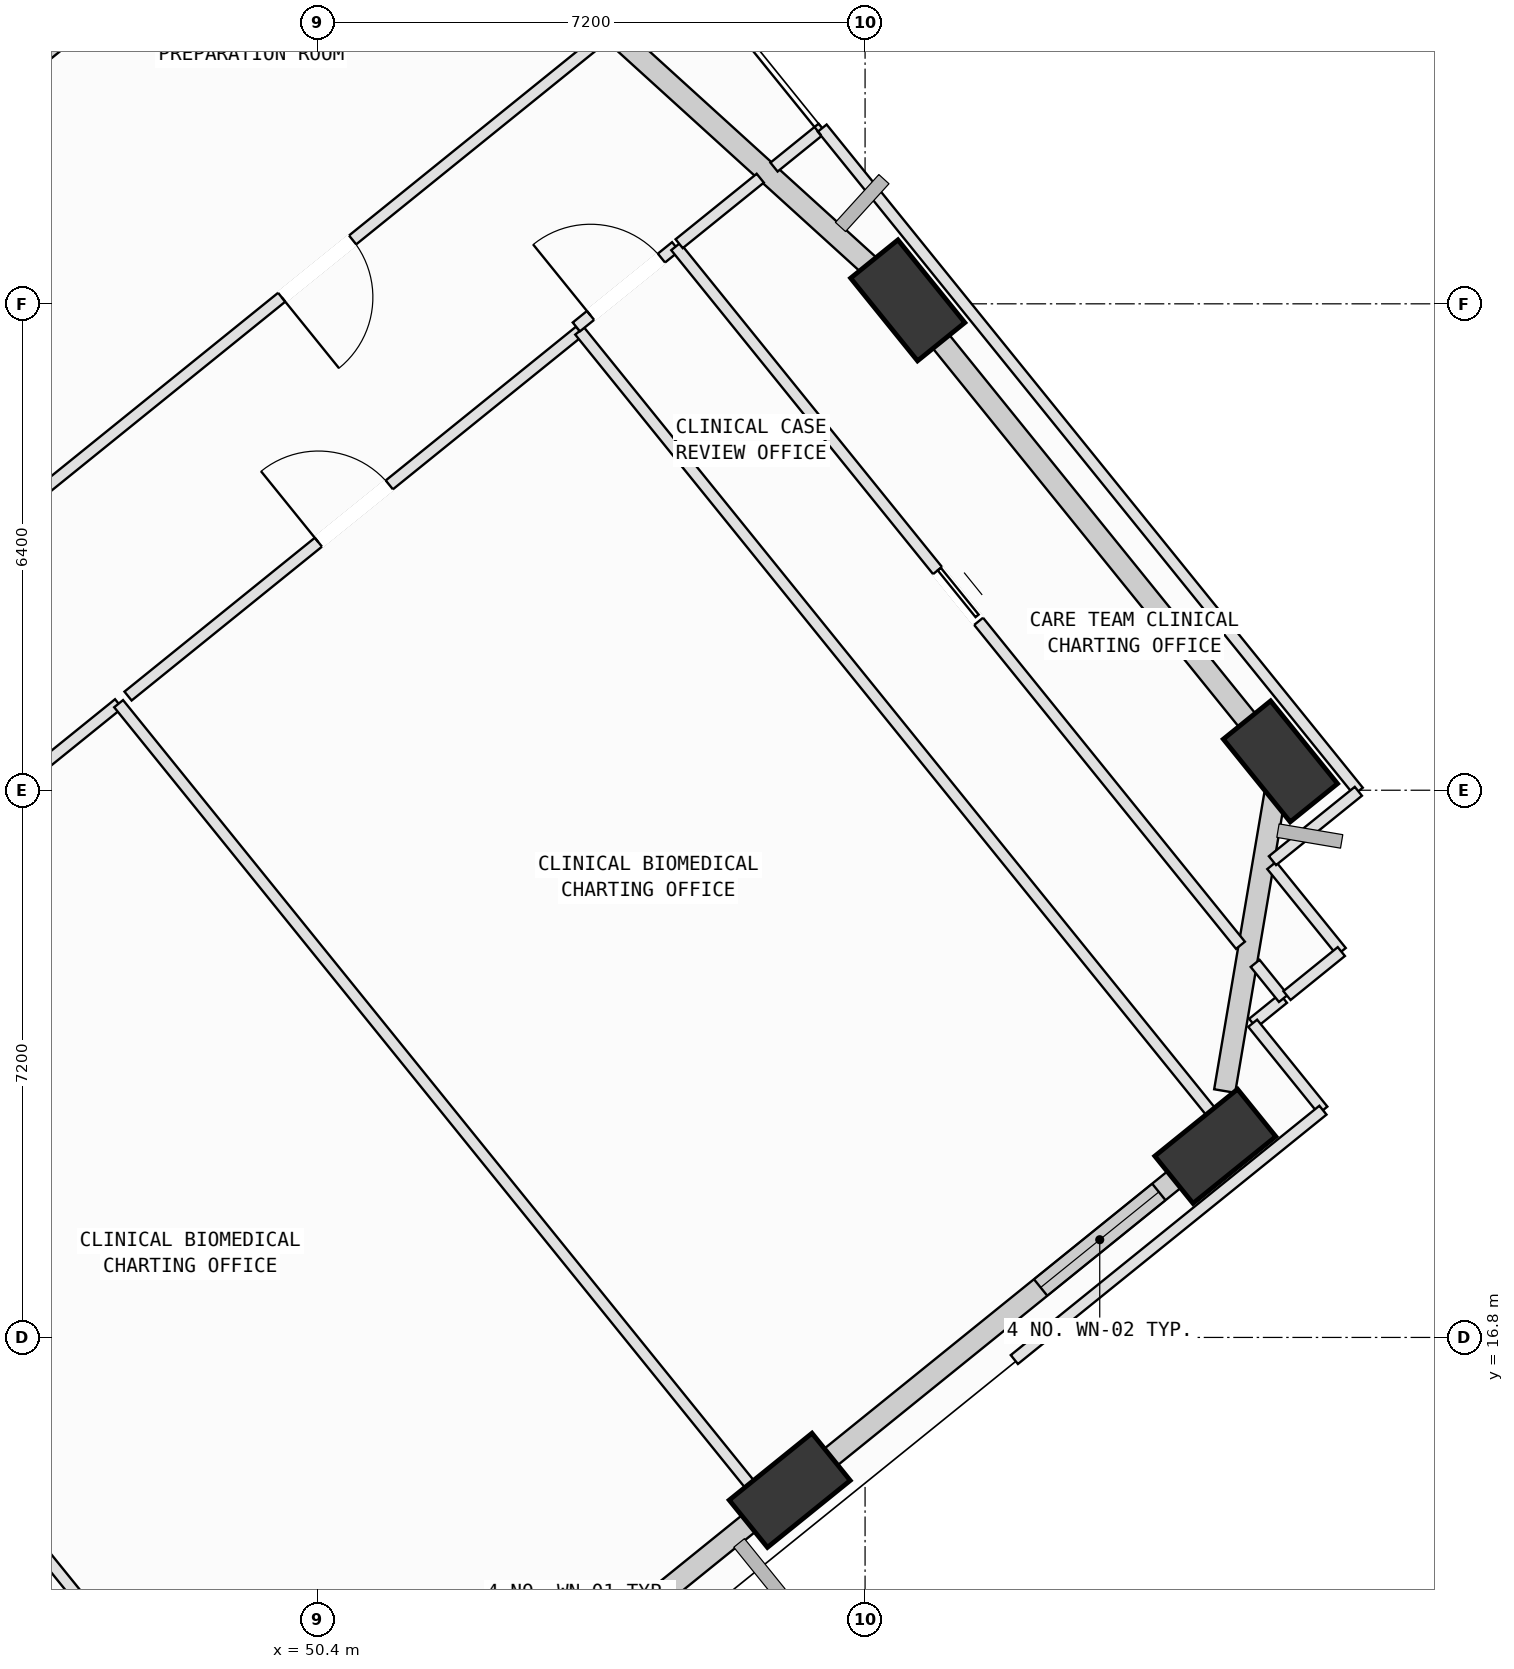
"""IFC4 building model, lengths in metres.
Left out: names, types, materials, properties, quantities, classifications, styles, units other than length and angle.
Written with IfcOpenShell. Run it as: python <this file> out.ifc"""

import sys

from ifc_helpers import new_model, si_unit, direction, frame, frame_2d, origin, origin_2d, place, context, subcontext, project, spatial, rectangle, extrude, element, fill, save


model = new_model("IFC4")
c1 = context("Model", 3, precision=1e-05, world=origin(), true_north=direction((0.0, 1.0)))
c2 = subcontext(c1, "Body", "Model", "MODEL_VIEW")
j1 = project(units=[si_unit("LENGTHUNIT", "METRE"), si_unit("PLANEANGLEUNIT", "RADIAN")], contexts=[c1])
p1 = place(None, origin())
s1 = spatial("IfcSite", under=j1, at=p1, CompositionType="ELEMENT")
p2 = place(p1, origin())
s2 = spatial("IfcBuilding", under=s1, at=p2, CompositionType="ELEMENT")
p3 = place(p2, frame((0.0, 0.0, 189.8)))
s3 = spatial("IfcBuildingStorey", under=s2, at=p3, CompositionType="ELEMENT", Elevation=189.8)
p4 = place(p3, frame((56.609, 14.789, 0.002), z_axis=(0.040468561583, 0.095155806966, 0.994639466301), x_axis=(-0.960371938901, -0.271035474756, 0.065003926005)))
e1 = element("IfcColumn", 1, at=p4, inside=s3, PredefinedType="COLUMN", context=c2, shape_type="SweptSolid", body=[
    extrude(rectangle(XDim=1.4, YDim=0.8, at=origin_2d()), origin(), (0.0, 0.0, 1.0), 4.018),
])
p5 = place(p3, frame((62.208, 19.315, 0.002), z_axis=(0.021591623712, 0.117904821617, 0.992790136345), x_axis=(-0.87739579049, -0.473812861045, 0.075352501881)))
e2 = element("IfcColumn", 2, at=p5, inside=s3, PredefinedType="COLUMN", context=c2, shape_type="SweptSolid", body=[
    extrude(rectangle(XDim=1.4, YDim=0.8, at=origin_2d()), origin(), (0.0, 0.0, 1.0), 4.025),
])
p6 = place(p3, frame((63.065, 24.379, 0.002), z_axis=(0.00072768673, 0.121220481061, 0.992625339916), x_axis=(0.623996645907, -0.775719377795, 0.09427424256)))
e3 = element("IfcColumn", 3, at=p6, inside=s3, PredefinedType="COLUMN", context=c2, shape_type="SweptSolid", body=[
    extrude(rectangle(XDim=1.4, YDim=0.8, at=origin_2d()), origin(), (0.0, 0.0, 1.0), 4.026),
])
p7 = place(p3, frame((58.161, 30.445, 0.002), z_axis=(-0.024061064309, 0.101105078309, 0.994584751705), x_axis=(0.790635707112, -0.606928768275, 0.080824803618)))
e4 = element("IfcColumn", 4, at=p7, inside=s3, PredefinedType="COLUMN", context=c2, shape_type="SweptSolid", body=[
    extrude(rectangle(XDim=1.4, YDim=0.8, at=origin_2d()), origin(), (0.0, 0.0, 1.0), 4.018),
])
p8 = place(p3, frame((56.373, 14.598, 0.0), z_axis=(0.0, 0.0, 1.0), x_axis=(-0.77770639609, -0.628627681129, 0.0)))
e5 = element("IfcWall", 5, at=p8, inside=s3, PredefinedType="SOLIDWALL", context=c2, shape_type="SweptSolid", body=[
    extrude(rectangle(XDim=6.218, YDim=0.28, at=frame_2d((3.109, 0.0))), origin(), (0.0, 0.0, 1.0), 3.265),
])
p9 = place(p8, frame((2.442, 0.0, 0.75)))
e6 = element("IfcOpeningElement", 6, at=p9, cuts=e5, PredefinedType="OPENING", context=c2, shape_type="SweptSolid", body=[
    extrude(rectangle(XDim=1.6, YDim=1.95, at=frame_2d((0.8, 0.975))), frame((0.0, 0.15, 0.0), z_axis=(0.0, -1.0, 0.0), x_axis=(1.0, 0.0, 0.0)), (0.0, 0.0, 1.0), 0.3),
])
p10 = place(p3, frame((61.984, 19.134, 0.0), z_axis=(0.0, 0.0, 1.0), x_axis=(-0.777691861755, -0.628645661848, 0.0)))
e7 = element("IfcWall", 7, at=p10, inside=s3, PredefinedType="SOLIDWALL", context=c2, shape_type="SweptSolid", body=[
    extrude(rectangle(XDim=6.242, YDim=0.28, at=frame_2d((3.121, 0.0))), origin(), (0.0, 0.0, 1.0), 3.265),
])
p11 = place(p10, frame((0.668, 0.0, 0.75)))
e8 = element("IfcOpeningElement", 8, at=p11, cuts=e7, PredefinedType="OPENING", context=c2, shape_type="SweptSolid", body=[
    extrude(rectangle(XDim=2.0, YDim=1.95, at=frame_2d((1.0, 0.975))), frame((0.0, 0.15, 0.0), z_axis=(0.0, -1.0, 0.0), x_axis=(1.0, 0.0, 0.0)), (0.0, 0.0, 1.0), 0.3),
])
p12 = place(p3, frame((63.022, 24.129, 0.0), z_axis=(0.0, 0.0, 1.0), x_axis=(-0.166795761072, -0.985991467554, 0.0)))
e9 = element("IfcWall", 9, at=p12, inside=s3, PredefinedType="SOLIDWALL", context=c2, shape_type="SweptSolid", body=[
    extrude(rectangle(XDim=4.145, YDim=0.28, at=frame_2d((2.073, 0.0))), origin(), (0.0, 0.0, 1.0), 3.265),
])
p13 = place(p3, frame((58.35, 30.212, 0.0), z_axis=(0.0, 0.0, 1.0), x_axis=(0.628622032356, -0.777710962014, 0.0)))
e10 = element("IfcWall", 10, at=p13, inside=s3, PredefinedType="SOLIDWALL", context=c2, shape_type="SweptSolid", body=[
    extrude(rectangle(XDim=6.84, YDim=0.28, at=frame_2d((3.42, 0.0))), origin(), (0.0, 0.0, 1.0), 3.265),
])
p14 = place(p3, frame((51.136, 36.829, 0.0), z_axis=(0.0, 0.0, 1.0), x_axis=(0.740111301714, -0.672484394671, 0.0)))
e11 = element("IfcWall", 11, at=p14, inside=s3, PredefinedType="SOLIDWALL", context=c2, shape_type="SweptSolid", body=[
    extrude(rectangle(XDim=8.838, YDim=0.28, at=frame_2d((4.419, 0.0))), origin(), (0.0, 0.0, 1.0), 3.265),
])
p15 = place(p3, frame((46.34, 33.363, 0.0), z_axis=(0.0, 0.0, 1.0), x_axis=(0.777703327774, 0.628631477074, 0.0)))
e12 = element("IfcWall", 12, at=p15, inside=s3, PredefinedType="SOLIDWALL", context=c2, shape_type="SweptSolid", body=[
    extrude(rectangle(XDim=5.405, YDim=0.28, at=frame_2d((2.702, 0.0))), origin(), (0.0, 0.0, 1.0), 3.265),
])
p16 = place(p15, frame((1.898, 0.0, 0.75)))
e13 = element("IfcOpeningElement", 13, at=p16, cuts=e12, PredefinedType="OPENING", context=c2, shape_type="SweptSolid", body=[
    extrude(rectangle(XDim=1.6, YDim=1.95, at=frame_2d((0.8, 0.975))), frame((0.0, 0.15, 0.0), z_axis=(0.0, -1.0, 0.0), x_axis=(1.0, 0.0, 0.0)), (0.0, 0.0, 1.0), 0.3),
])
p17 = place(p3, frame((41.744, 20.196, 0.0), z_axis=(0.0, 0.0, 1.0), x_axis=(0.628664865479, -0.777676338146, 0.0)))
e14 = element("IfcWall", 14, at=p17, inside=s3, PredefinedType="PARTITIONING", context=c2, shape_type="SweptSolid", body=[
    extrude(rectangle(XDim=13.435, YDim=0.15, at=frame_2d((6.717, 0.0))), origin(), (0.0, 0.0, 1.0), 3.78),
])
p18 = place(p3, frame((41.837, 20.336, 0.0), z_axis=(0.0, 0.0, 1.0), x_axis=(0.777713450533, 0.628618953628, 0.0)))
e15 = element("IfcWall", 15, at=p18, inside=s3, PredefinedType="PARTITIONING", context=c2, shape_type="SweptSolid", body=[
    extrude(rectangle(XDim=7.641, YDim=0.15, at=frame_2d((3.82, 0.0))), origin(), (0.0, 0.0, 1.0), 3.065),
])
p19 = place(p18, frame((3.22, 0.0, 0.0)))
e16 = element("IfcOpeningElement", 16, at=p19, cuts=e15, PredefinedType="OPENING", context=c2, shape_type="SweptSolid", body=[
    extrude(rectangle(XDim=1.2, YDim=2.15, at=frame_2d((0.6, 1.075))), frame((0.0, 0.085, 0.0), z_axis=(0.0, -1.0, 0.0), x_axis=(1.0, 0.0, 0.0)), (0.0, 0.0, 1.0), 0.17),
])
p20 = place(p3, frame((47.779, 25.139, 0.0), z_axis=(0.0, 0.0, 1.0), x_axis=(0.628603815075, -0.777725686649, 0.0)))
e17 = element("IfcWall", 17, at=p20, inside=s3, PredefinedType="PARTITIONING", context=c2, shape_type="SweptSolid", body=[
    extrude(rectangle(XDim=13.486, YDim=0.15, at=frame_2d((6.743, 0.0))), origin(), (0.0, 0.0, 1.0), 3.78),
])
p21 = place(p3, frame((47.903, 25.239, 0.0), z_axis=(0.0, 0.0, 1.0), x_axis=(0.777700823306, 0.628634575433, 0.0)))
e18 = element("IfcWall", 18, at=p21, inside=s3, PredefinedType="PARTITIONING", context=c2, shape_type="SweptSolid", body=[
    extrude(rectangle(XDim=7.64, YDim=0.15, at=frame_2d((3.82, 0.0))), origin(), (0.0, 0.0, 1.0), 3.78),
])
p22 = place(p21, frame((3.22, 0.0, 0.0)))
e19 = element("IfcOpeningElement", 19, at=p22, cuts=e18, PredefinedType="OPENING", context=c2, shape_type="SweptSolid", body=[
    extrude(rectangle(XDim=1.2, YDim=2.15, at=frame_2d((0.6, 1.075))), frame((0.0, 0.085, 0.0), z_axis=(0.0, -1.0, 0.0), x_axis=(1.0, 0.0, 0.0)), (0.0, 0.0, 1.0), 0.17),
])
p23 = place(p3, frame((53.845, 30.042, 0.0), z_axis=(0.0, 0.0, 1.0), x_axis=(0.628663319938, -0.777677587541, 0.0)))
e20 = element("IfcWall", 20, at=p23, inside=s3, PredefinedType="PARTITIONING", context=c2, shape_type="SweptSolid", body=[
    extrude(rectangle(XDim=13.83, YDim=0.15, at=frame_2d((6.915, 0.0))), origin(), (0.0, 0.0, 1.0), 3.78),
])
p24 = place(p3, frame((62.539, 19.287, 0.0), z_axis=(0.0, 0.0, 1.0), x_axis=(-0.777244870707, -0.629198228668, 0.0)))
e21 = element("IfcWall", 21, at=p24, inside=s3, PredefinedType="PARTITIONING", context=c2, shape_type="SweptSolid", body=[
    extrude(rectangle(XDim=0.528, YDim=0.15, at=frame_2d((0.264, 0.0))), origin(), (0.0, 0.0, 1.0), 3.78),
])
p25 = place(p3, frame((57.274, 15.031, 0.0), z_axis=(0.0, 0.0, 1.0), x_axis=(-0.777323313419, -0.629101316494, 0.0)))
e22 = element("IfcWall", 22, at=p25, inside=s3, PredefinedType="PARTITIONING", context=c2, shape_type="SweptSolid", body=[
    extrude(rectangle(XDim=0.87, YDim=0.15, at=frame_2d((0.435, 0.0))), origin(), (0.0, 0.0, 1.0), 3.265),
])
p26 = place(p3, frame((54.169, 33.917, 0.0), z_axis=(0.0, 0.0, 1.0), x_axis=(-0.777735624906, -0.628591518995, 0.0)))
e23 = element("IfcWall", 23, at=p26, inside=s3, PredefinedType="PARTITIONING", context=c2, shape_type="SweptSolid", body=[
    extrude(rectangle(XDim=9.715, YDim=0.15, at=frame_2d((4.858, 0.0))), origin(), (0.0, 0.0, 1.0), 3.78),
])
p27 = place(p26, frame((4.258, 0.0, 0.0)))
e24 = element("IfcOpeningElement", 24, at=p27, cuts=e23, PredefinedType="OPENING", context=c2, shape_type="SweptSolid", body=[
    extrude(rectangle(XDim=1.2, YDim=2.15, at=frame_2d((0.6, 1.075))), frame((0.0, 0.085, 0.0), z_axis=(0.0, -1.0, 0.0), x_axis=(1.0, 0.0, 0.0)), (0.0, 0.0, 1.0), 0.17),
])
p28 = place(p3, frame((43.445, 31.729, 0.0), z_axis=(0.0, 0.0, 1.0), x_axis=(0.777689532668, 0.628648543129, 0.0)))
e25 = element("IfcWall", 25, at=p28, inside=s3, PredefinedType="PARTITIONING", context=c2, shape_type="SweptSolid", body=[
    extrude(rectangle(XDim=9.688, YDim=0.15, at=frame_2d((4.844, 0.0))), origin(), (0.0, 0.0, 1.0), 3.065),
])
p29 = place(p3, frame((63.104, 21.261, 0.0), z_axis=(0.0, 0.0, 1.0), x_axis=(-0.777419867084, -0.628981995182, 0.0)))
e26 = element("IfcWall", 26, at=p29, inside=s3, PredefinedType="PARTITIONING", context=c2, shape_type="SweptSolid", body=[
    extrude(rectangle(XDim=0.52, YDim=0.15, at=frame_2d((0.26, 0.0))), origin(), (0.0, 0.0, 1.0), 3.78),
])
p30 = place(p3, frame((62.7, 20.934, 0.0), z_axis=(0.0, 0.0, 1.0), x_axis=(0.628352563695, -0.777928695767, 0.0)))
e27 = element("IfcWall", 27, at=p30, inside=s3, PredefinedType="PARTITIONING", context=c2, shape_type="SweptSolid", body=[
    extrude(rectangle(XDim=1.471, YDim=0.15, at=frame_2d((0.735, 0.0))), origin(), (0.0, 0.0, 1.0), 3.78),
])
p31 = place(p3, frame((63.624, 19.79, 0.0), z_axis=(0.0, 0.0, 1.0), x_axis=(-0.777779365742, -0.628537396044, 0.0)))
e28 = element("IfcWall", 28, at=p31, inside=s3, PredefinedType="PARTITIONING", context=c2, shape_type="SweptSolid", body=[
    extrude(rectangle(XDim=5.22, YDim=0.15, at=frame_2d((2.61, 0.0))), origin(), (0.0, 0.0, 1.0), 3.78),
])
p32 = place(p3, frame((53.801, 30.096, 0.0), z_axis=(0.0, 0.0, 1.0), x_axis=(0.7774849622, 0.628901529297, 0.0)))
e29 = element("IfcWall", 29, at=p32, inside=s3, PredefinedType="PARTITIONING", context=c2, shape_type="SweptSolid", body=[
    extrude(rectangle(XDim=1.681, YDim=0.15, at=frame_2d((0.84, 0.0))), origin(), (0.0, 0.0, 1.0), 3.78),
])
p33 = place(p32, frame((0.24, 0.0, 0.0)))
e30 = element("IfcOpeningElement", 30, at=p33, cuts=e29, PredefinedType="OPENING", context=c2, shape_type="SweptSolid", body=[
    extrude(rectangle(XDim=1.2, YDim=2.15, at=frame_2d((0.6, 1.075))), frame((0.0, 0.085, 0.0), z_axis=(0.0, -1.0, 0.0), x_axis=(1.0, 0.0, 0.0)), (0.0, 0.0, 1.0), 0.17),
])
p34 = place(p3, frame((55.108, 31.153, 0.0), z_axis=(0.0, 0.0, 1.0), x_axis=(0.628641365164, -0.777695334951, 0.0)))
e31 = element("IfcWall", 31, at=p34, inside=s3, PredefinedType="PARTITIONING", context=c2, shape_type="SweptSolid", body=[
    extrude(rectangle(XDim=11.821, YDim=0.15, at=frame_2d((5.911, 0.0))), origin(), (0.0, 0.0, 1.0), 3.78),
])
p35 = place(p34, frame((5.48, 0.0, 0.0)))
e32 = element("IfcOpeningElement", 32, at=p35, cuts=e31, PredefinedType="OPENING", context=c2, shape_type="SweptSolid", body=[
    extrude(rectangle(XDim=0.86, YDim=2.06, at=frame_2d((0.43, 1.03))), frame((0.0, 0.085, 0.0), z_axis=(0.0, -1.0, 0.0), x_axis=(1.0, 0.0, 0.0)), (0.0, 0.0, 1.0), 0.17),
])
p36 = place(p3, frame((62.732, 21.722, 0.0), z_axis=(0.0, 0.0, 1.0), x_axis=(0.628106839995, -0.778127108865, 0.0)))
e33 = element("IfcWall", 33, at=p36, inside=s3, PredefinedType="PARTITIONING", context=c2, shape_type="SweptSolid", body=[
    extrude(rectangle(XDim=0.592, YDim=0.15, at=frame_2d((0.296, 0.0))), origin(), (0.0, 0.0, 1.0), 3.78),
])
p37 = place(p3, frame((62.95, 23.01, 0.0), z_axis=(0.0, 0.0, 1.0), x_axis=(0.62869196674, -0.777654429009, 0.0)))
e34 = element("IfcWall", 34, at=p37, inside=s3, PredefinedType="PARTITIONING", context=c2, shape_type="SweptSolid", body=[
    extrude(rectangle(XDim=1.457, YDim=0.15, at=frame_2d((0.729, 0.0))), origin(), (0.0, 0.0, 1.0), 3.78),
])
p38 = place(p3, frame((63.866, 21.877, 0.0), z_axis=(0.0, 0.0, 1.0), x_axis=(-0.777257230073, -0.629182960909, 0.0)))
e35 = element("IfcWall", 35, at=p38, inside=s3, PredefinedType="PARTITIONING", context=c2, shape_type="SweptSolid", body=[
    extrude(rectangle(XDim=0.92, YDim=0.15, at=frame_2d((0.46, 0.0))), origin(), (0.0, 0.0, 1.0), 3.78),
])
p39 = place(p3, frame((55.154, 31.191, 0.0), z_axis=(0.0, 0.0, 1.0), x_axis=(0.777820699298, 0.628486244673, 0.0)))
e36 = element("IfcWall", 36, at=p39, inside=s3, PredefinedType="PARTITIONING", context=c2, shape_type="SweptSolid", body=[
    extrude(rectangle(XDim=1.372, YDim=0.15, at=frame_2d((0.686, 0.0))), origin(), (0.0, 0.0, 1.0), 3.78),
])
p40 = place(p3, frame((56.402, 32.199, 0.0), z_axis=(0.0, 0.0, 1.0), x_axis=(0.777321568361, 0.629103472699, 0.0)))
e37 = element("IfcWall", 37, at=p40, inside=s3, PredefinedType="PARTITIONING", context=c2, shape_type="SweptSolid", body=[
    extrude(rectangle(XDim=0.815, YDim=0.15, at=frame_2d((0.408, 0.0))), origin(), (0.0, 0.0, 1.0), 3.78),
])
p41 = place(p3, frame((57.036, 32.712, 0.0), z_axis=(0.0, 0.0, 1.0), x_axis=(0.62868295639, -0.777661713308, 0.0)))
e38 = element("IfcWall", 38, at=p41, inside=s3, PredefinedType="PARTITIONING", context=c2, shape_type="SweptSolid", body=[
    extrude(rectangle(XDim=11.221, YDim=0.15, at=frame_2d((5.61, 0.0))), origin(), (0.0, 0.0, 1.0), 3.265),
])
p42 = place(p3, frame((64.09, 23.986, 0.0), z_axis=(0.0, 0.0, 1.0), x_axis=(-0.77784323693, -0.628458350857, 0.0)))
e39 = element("IfcWall", 39, at=p42, inside=s3, PredefinedType="PARTITIONING", context=c2, shape_type="SweptSolid", body=[
    extrude(rectangle(XDim=1.453, YDim=0.15, at=frame_2d((0.727, 0.0))), origin(), (0.0, 0.0, 1.0), 3.78),
])
p43 = place(p11, origin())
e40 = element("IfcWindow", 40, at=p43, inside=s3, PartitioningType="SINGLE_PANEL", PredefinedType="WINDOW", context=c2, shape_type="SweptSolid", body=[
    extrude(rectangle(XDim=2.0, YDim=1.95, at=frame_2d((1.0, 0.975))), frame((0.0, 0.03, 0.0), z_axis=(0.0, -1.0, 0.0), x_axis=(1.0, 0.0, 0.0)), (0.0, 0.0, 1.0), 0.06),
])
fill(e8, e40)
p44 = place(p22, origin())
e41 = element("IfcDoor", 41, at=p44, inside=s3, OperationType="SINGLE_SWING_LEFT", PredefinedType="DOOR", context=c2, shape_type="SweptSolid", body=[
    extrude(rectangle(XDim=1.2, YDim=2.15, at=frame_2d((0.6, 1.075))), frame((0.0, 0.025, 0.0), z_axis=(0.0, -1.0, 0.0), x_axis=(1.0, 0.0, 0.0)), (0.0, 0.0, 1.0), 0.05),
])
fill(e19, e41)
p45 = place(p27, origin())
e42 = element("IfcDoor", 42, at=p45, inside=s3, OperationType="SINGLE_SWING_RIGHT", PredefinedType="DOOR", context=c2, shape_type="SweptSolid", body=[
    extrude(rectangle(XDim=1.2, YDim=2.15, at=frame_2d((0.6, 1.075))), frame((0.0, 0.025, 0.0), z_axis=(0.0, -1.0, 0.0), x_axis=(1.0, 0.0, 0.0)), (0.0, 0.0, 1.0), 0.05),
])
fill(e24, e42)
p46 = place(p33, origin())
e43 = element("IfcDoor", 43, at=p46, inside=s3, OperationType="SINGLE_SWING_LEFT", PredefinedType="DOOR", context=c2, shape_type="SweptSolid", body=[
    extrude(rectangle(XDim=1.2, YDim=2.15, at=frame_2d((0.6, 1.075))), frame((0.0, 0.025, 0.0), z_axis=(0.0, -1.0, 0.0), x_axis=(1.0, 0.0, 0.0)), (0.0, 0.0, 1.0), 0.05),
])
fill(e30, e43)
p47 = place(p35, origin())
e44 = element("IfcDoor", 44, at=p47, inside=s3, OperationType="SLIDING_TO_LEFT", PredefinedType="DOOR", context=c2, shape_type="SweptSolid", body=[
    extrude(rectangle(XDim=0.86, YDim=2.06, at=frame_2d((0.43, 1.03))), frame((0.0, 0.025, 0.0), z_axis=(0.0, -1.0, 0.0), x_axis=(1.0, 0.0, 0.0)), (0.0, 0.0, 1.0), 0.05),
])
fill(e32, e44)
save(model, sys.argv[1])
